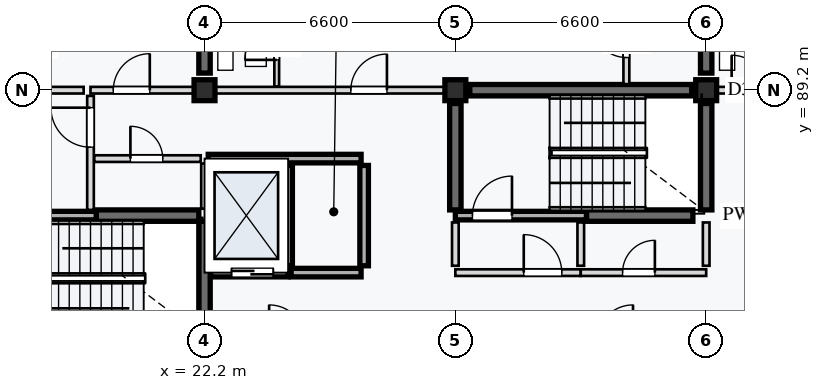
"""IFC4 building model, lengths in metres.
Left out: names, types, materials, properties, quantities, classifications, styles, units other than length and angle.
Written with IfcOpenShell. Run it as: python <this file> out.ifc"""

import sys

from ifc_helpers import new_model, si_unit, direction, frame, frame_2d, origin, origin_2d, place, context, subcontext, project, spatial, rectangle, extrude, element, fill, save


model = new_model("IFC4")
c1 = context("Model", 3, precision=1e-05, world=origin(), true_north=direction((0.0, 1.0)))
c2 = subcontext(c1, "Body", "Model", "MODEL_VIEW")
j1 = project(units=[si_unit("LENGTHUNIT", "METRE"), si_unit("PLANEANGLEUNIT", "RADIAN")], contexts=[c1])
p1 = place(None, origin())
s1 = spatial("IfcSite", under=j1, at=p1, CompositionType="ELEMENT")
p2 = place(p1, origin())
s2 = spatial("IfcBuilding", under=s1, at=p2, CompositionType="ELEMENT")
p3 = place(p2, frame((0.0, 0.0, 30.8)))
s3 = spatial("IfcBuildingStorey", under=s2, at=p3, CompositionType="ELEMENT", Elevation=30.8)
for number, where, z_axis, x_axis in (
    (1, (22.2, 89.2, 0.0), (0.0, 0.0, 1.0), (1.0, 0.0, 0.0)),
    (2, (28.8, 89.2, 0.0), (0.0, 0.0, 1.0), (1.0, 0.0, 0.0)),
    (3, (35.4, 89.2, 0.0), (0.0, 0.0, 1.0), (1.0, 0.0, 0.0)),
):
    element("IfcColumn", number, at=place(p3, frame(where, z_axis=z_axis, x_axis=x_axis)), inside=s3, PredefinedType="COLUMN", context=c2, shape_type="SweptSolid", body=[
        extrude(rectangle(XDim=0.55, YDim=0.55, at=origin_2d()), origin(), (0.0, 0.0, 1.0), 3.2),
    ])
p4 = place(p3, frame((19.35, 85.9, 0.0), z_axis=(0.0, 0.0, 1.0), x_axis=(1.0, 0.0, 0.0)))
e4 = element("IfcWall", 4, at=p4, inside=s3, PredefinedType="SHEAR", context=c2, shape_type="SweptSolid", body=[
    extrude(rectangle(XDim=2.7, YDim=0.3, at=frame_2d((1.35, 0.0))), origin(), (0.0, 0.0, 1.0), 2.97),
])
p5 = place(p3, frame((22.2, 82.95, 0.0), z_axis=(0.0, 0.0, 1.0), x_axis=(0.0, 1.0, 0.0)))
e5 = element("IfcWall", 5, at=p5, inside=s3, PredefinedType="SHEAR", context=c2, shape_type="SweptSolid", body=[
    extrude(rectangle(XDim=2.8, YDim=0.3, at=frame_2d((1.4, 0.0))), origin(), (0.0, 0.0, 1.0), 2.97),
])
p6 = place(p3, frame((29.18, 89.2, 0.0), z_axis=(0.0, 0.0, 1.0), x_axis=(1.0, 0.0, 0.0)))
e6 = element("IfcWall", 6, at=p6, inside=s3, PredefinedType="SHEAR", context=c2, shape_type="SweptSolid", body=[
    extrude(rectangle(XDim=5.84, YDim=0.3, at=frame_2d((2.92, 0.0))), origin(), (0.0, 0.0, 1.0), 2.97),
])
for number, where, z_axis, x_axis in (
    (7, (32.25, 85.9, 0.0), (0.0, 0.0, 1.0), (1.0, 0.0, 0.0)),
    (8, (28.8, 86.05, 0.0), (0.0, 0.0, 1.0), (0.0, 1.0, 0.0)),
    (9, (35.4, 86.05, 0.0), (0.0, 0.0, 1.0), (0.0, 1.0, 0.0)),
):
    element("IfcWall", number, at=place(p3, frame(where, z_axis=z_axis, x_axis=x_axis)), inside=s3, PredefinedType="SHEAR", context=c2, shape_type="SweptSolid", body=[
        extrude(rectangle(XDim=2.8, YDim=0.3, at=frame_2d((1.4, 0.0))), origin(), (0.0, 0.0, 1.0), 2.97),
    ])
for number, where, z_axis, x_axis in (
    (10, (22.2, 89.65, 0.0), (0.0, 0.0, 1.0), (0.0, 1.0, 0.0)),
    (11, (35.4, 89.65, 0.0), (0.0, 0.0, 1.0), (0.0, 1.0, 0.0)),
):
    element("IfcWall", number, at=place(p3, frame(where, z_axis=z_axis, x_axis=x_axis)), inside=s3, PredefinedType="SHEAR", context=c2, shape_type="SweptSolid", body=[
        extrude(rectangle(XDim=5.7, YDim=0.3, at=frame_2d((2.85, 0.0))), origin(), (0.0, 0.0, 1.0), 2.97),
    ])
p7 = place(p3, frame((15.75, 85.9, 0.0), z_axis=(0.0, 0.0, 1.0), x_axis=(1.0, 0.0, 0.0)))
e12 = element("IfcWall", 12, at=p7, inside=s3, PredefinedType="STANDARD", context=c2, shape_type="SweptSolid", body=[
    extrude(rectangle(XDim=3.6, YDim=0.225, at=frame_2d((1.8, 0.0))), origin(), (0.0, 0.0, 1.0), 2.97),
])
p8 = place(p7, frame((0.45, 0.0, 0.0)))
e13 = element("IfcOpeningElement", 13, at=p8, cuts=e12, PredefinedType="OPENING", context=c2, shape_type="SweptSolid", body=[
    extrude(rectangle(XDim=1.0, YDim=2.16, at=frame_2d((0.5, 1.08))), frame((0.0, 0.123, 0.0), z_axis=(0.0, -1.0, 0.0), x_axis=(1.0, 0.0, 0.0)), (0.0, 0.0, 1.0), 0.245),
])
p9 = place(p3, frame((19.2, 86.05, 0.0), z_axis=(0.0, 0.0, 1.0), x_axis=(0.0, 1.0, 0.0)))
e14 = element("IfcWall", 14, at=p9, inside=s3, PredefinedType="PARTITIONING", context=c2, shape_type="SweptSolid", body=[
    extrude(rectangle(XDim=3.0, YDim=0.175, at=frame_2d((1.5, 0.0))), origin(), (0.0, 0.0, 1.0), 2.97),
])
p10 = place(p9, frame((1.65, 0.0, 0.0)))
e15 = element("IfcOpeningElement", 15, at=p10, cuts=e14, PredefinedType="OPENING", context=c2, shape_type="SweptSolid", body=[
    extrude(rectangle(XDim=1.04, YDim=2.12, at=frame_2d((0.52, 1.06))), frame((0.0, 0.097, 0.0), z_axis=(0.0, -1.0, 0.0), x_axis=(1.0, 0.0, 0.0)), (0.0, 0.0, 1.0), 0.195),
])
p11 = place(p3, frame((19.3, 87.4, 0.0), z_axis=(0.0, 0.0, 1.0), x_axis=(1.0, 0.0, 0.0)))
e16 = element("IfcWall", 16, at=p11, inside=s3, PredefinedType="PARTITIONING", context=c2, shape_type="SweptSolid", body=[
    extrude(rectangle(XDim=2.8, YDim=0.175, at=frame_2d((1.4, 0.0))), origin(), (0.0, 0.0, 1.0), 2.97),
])
p12 = place(p11, frame((0.95, 0.0, 0.0)))
e17 = element("IfcOpeningElement", 17, at=p12, cuts=e16, PredefinedType="OPENING", context=c2, shape_type="SweptSolid", body=[
    extrude(rectangle(XDim=0.85, YDim=2.0, at=frame_2d((0.425, 1.0))), frame((0.0, 0.097, 0.0), z_axis=(0.0, -1.0, 0.0), x_axis=(1.0, 0.0, 0.0)), (0.0, 0.0, 1.0), 0.195),
])
p13 = place(p3, frame((22.2, 86.08, 0.0), z_axis=(0.0, 0.0, 1.0), x_axis=(0.0, 1.0, 0.0)))
e18 = element("IfcWall", 18, at=p13, inside=s3, PredefinedType="PARTITIONING", context=c2, shape_type="SweptSolid", body=[
    extrude(rectangle(XDim=1.19, YDim=0.175, at=frame_2d((0.595, 0.0))), origin(), (0.0, 0.0, 1.0), 2.97),
])
p14 = place(p3, frame((22.36, 84.4, 0.0), z_axis=(0.0, 0.0, 1.0), x_axis=(1.0, 0.0, 0.0)))
e19 = element("IfcWall", 19, at=p14, inside=s3, PredefinedType="STANDARD", context=c2, shape_type="SweptSolid", body=[
    extrude(rectangle(XDim=2.04, YDim=0.225, at=frame_2d((1.02, 0.0))), origin(), (0.0, 0.0, 1.0), 2.97),
])
p15 = place(p14, frame((0.55, 0.0, 0.0)))
e20 = element("IfcOpeningElement", 20, at=p15, cuts=e19, PredefinedType="OPENING", context=c2, shape_type="SweptSolid", body=[
    extrude(rectangle(XDim=1.1, YDim=2.1, at=frame_2d((0.55, 1.05))), frame((0.0, 0.123, 0.0), z_axis=(0.0, -1.0, 0.0), x_axis=(1.0, 0.0, 0.0)), (0.0, 0.0, 1.0), 0.245),
])
p16 = place(p3, frame((24.48, 84.4, 0.0), z_axis=(0.0, 0.0, 1.0), x_axis=(1.0, 0.0, 0.0)))
e21 = element("IfcWall", 21, at=p16, inside=s3, PredefinedType="STANDARD", context=c2, shape_type="SweptSolid", body=[
    extrude(rectangle(XDim=1.84, YDim=0.225, at=frame_2d((0.92, 0.0))), origin(), (0.0, 0.0, 1.0), 2.97),
])
p17 = place(p3, frame((22.298, 87.4, 0.0), z_axis=(0.0, 0.0, 1.0), x_axis=(1.0, 0.0, 0.0)))
e22 = element("IfcWall", 22, at=p17, inside=s3, PredefinedType="STANDARD", context=c2, shape_type="SweptSolid", body=[
    extrude(rectangle(XDim=4.022, YDim=0.225, at=frame_2d((2.011, 0.0))), origin(), (0.0, 0.0, 1.0), 2.97),
])
for number, where, z_axis, x_axis in (
    (23, (24.4, 84.58, 0.0), (0.0, 0.0, 1.0), (0.0, 1.0, 0.0)),
    (24, (26.4, 84.58, 0.0), (0.0, 0.0, 1.0), (0.0, 1.0, 0.0)),
):
    element("IfcWall", number, at=place(p3, frame(where, z_axis=z_axis, x_axis=x_axis)), inside=s3, PredefinedType="STANDARD", context=c2, shape_type="SweptSolid", body=[
        extrude(rectangle(XDim=2.64, YDim=0.225, at=frame_2d((1.32, 0.0))), origin(), (0.0, 0.0, 1.0), 2.97),
    ])
p18 = place(p3, frame((28.8, 85.9, 0.0), z_axis=(0.0, 0.0, 1.0), x_axis=(1.0, 0.0, 0.0)))
e25 = element("IfcWall", 25, at=p18, inside=s3, PredefinedType="STANDARD", context=c2, shape_type="SweptSolid", body=[
    extrude(rectangle(XDim=3.45, YDim=0.225, at=frame_2d((1.725, 0.0))), origin(), (0.0, 0.0, 1.0), 2.97),
])
p19 = place(p18, frame((0.45, 0.0, 0.0)))
e26 = element("IfcOpeningElement", 26, at=p19, cuts=e25, PredefinedType="OPENING", context=c2, shape_type="SweptSolid", body=[
    extrude(rectangle(XDim=1.04, YDim=2.12, at=frame_2d((0.52, 1.06))), frame((0.0, 0.123, 0.0), z_axis=(0.0, -1.0, 0.0), x_axis=(1.0, 0.0, 0.0)), (0.0, 0.0, 1.0), 0.245),
])
p20 = place(p3, frame((28.8, 84.4, 0.0), z_axis=(0.0, 0.0, 1.0), x_axis=(1.0, 0.0, 0.0)))
e27 = element("IfcWall", 27, at=p20, inside=s3, PredefinedType="PARTITIONING", context=c2, shape_type="SweptSolid", body=[
    extrude(rectangle(XDim=3.3, YDim=0.175, at=frame_2d((1.65, 0.0))), origin(), (0.0, 0.0, 1.0), 2.97),
])
p21 = place(p20, frame((1.8, 0.0, 0.0)))
e28 = element("IfcOpeningElement", 28, at=p21, cuts=e27, PredefinedType="OPENING", context=c2, shape_type="SweptSolid", body=[
    extrude(rectangle(XDim=1.0, YDim=2.1, at=frame_2d((0.5, 1.05))), frame((0.0, 0.097, 0.0), z_axis=(0.0, -1.0, 0.0), x_axis=(1.0, 0.0, 0.0)), (0.0, 0.0, 1.0), 0.195),
])
p22 = place(p3, frame((32.1, 84.4, 0.0), z_axis=(0.0, 0.0, 1.0), x_axis=(1.0, 0.0, 0.0)))
e29 = element("IfcWall", 29, at=p22, inside=s3, PredefinedType="PARTITIONING", context=c2, shape_type="SweptSolid", body=[
    extrude(rectangle(XDim=3.3, YDim=0.175, at=frame_2d((1.65, 0.0))), origin(), (0.0, 0.0, 1.0), 2.97),
])
p23 = place(p22, frame((1.1, 0.0, 0.0)))
e30 = element("IfcOpeningElement", 30, at=p23, cuts=e29, PredefinedType="OPENING", context=c2, shape_type="SweptSolid", body=[
    extrude(rectangle(XDim=0.85, YDim=2.0, at=frame_2d((0.425, 1.0))), frame((0.0, 0.097, 0.0), z_axis=(0.0, -1.0, 0.0), x_axis=(1.0, 0.0, 0.0)), (0.0, 0.0, 1.0), 0.195),
])
for number, where, z_axis, x_axis in (
    (31, (28.8, 84.58, 0.0), (0.0, 0.0, 1.0), (0.0, 1.0, 0.0)),
    (32, (32.1, 84.58, 0.0), (0.0, 0.0, 1.0), (0.0, 1.0, 0.0)),
    (33, (35.4, 84.58, 0.0), (0.0, 0.0, 1.0), (0.0, 1.0, 0.0)),
):
    element("IfcWall", number, at=place(p3, frame(where, z_axis=z_axis, x_axis=x_axis)), inside=s3, PredefinedType="PARTITIONING", context=c2, shape_type="SweptSolid", body=[
        extrude(rectangle(XDim=1.14, YDim=0.175, at=frame_2d((0.57, 0.0))), origin(), (0.0, 0.0, 1.0), 2.97),
    ])
p24 = place(p3, frame((15.88, 89.2, 0.0), z_axis=(0.0, 0.0, 1.0), x_axis=(1.0, 0.0, 0.0)))
e34 = element("IfcWall", 34, at=p24, inside=s3, PredefinedType="PARTITIONING", context=c2, shape_type="SweptSolid", body=[
    extrude(rectangle(XDim=3.14, YDim=0.175, at=frame_2d((1.57, 0.0))), origin(), (0.0, 0.0, 1.0), 2.55),
])
p25 = place(p3, frame((19.2, 89.2, 0.0), z_axis=(0.0, 0.0, 1.0), x_axis=(1.0, 0.0, 0.0)))
e35 = element("IfcWall", 35, at=p25, inside=s3, PredefinedType="PARTITIONING", context=c2, shape_type="SweptSolid", body=[
    extrude(rectangle(XDim=3.0, YDim=0.175, at=frame_2d((1.5, 0.0))), origin(), (0.0, 0.0, 1.0), 2.55),
])
p26 = place(p25, frame((0.6, 0.0, 0.0)))
e36 = element("IfcOpeningElement", 36, at=p26, cuts=e35, PredefinedType="OPENING", context=c2, shape_type="SweptSolid", body=[
    extrude(rectangle(XDim=0.96, YDim=2.18, at=frame_2d((0.48, 1.09))), frame((0.0, 0.097, 0.0), z_axis=(0.0, -1.0, 0.0), x_axis=(1.0, 0.0, 0.0)), (0.0, 0.0, 1.0), 0.195),
])
p27 = place(p3, frame((22.2, 89.2, 0.0), z_axis=(0.0, 0.0, 1.0), x_axis=(1.0, 0.0, 0.0)))
e37 = element("IfcWall", 37, at=p27, inside=s3, PredefinedType="PARTITIONING", context=c2, shape_type="SweptSolid", body=[
    extrude(rectangle(XDim=6.6, YDim=0.175, at=frame_2d((3.3, 0.0))), origin(), (0.0, 0.0, 1.0), 2.55),
])
p28 = place(p27, frame((3.85, 0.0, 0.0)))
e38 = element("IfcOpeningElement", 38, at=p28, cuts=e37, PredefinedType="OPENING", context=c2, shape_type="SweptSolid", body=[
    extrude(rectangle(XDim=0.95, YDim=2.16, at=frame_2d((0.475, 1.08))), frame((0.0, 0.097, 0.0), z_axis=(0.0, -1.0, 0.0), x_axis=(1.0, 0.0, 0.0)), (0.0, 0.0, 1.0), 0.195),
])
p29 = place(p3, frame((24.1, 89.298, 0.0), z_axis=(0.0, 0.0, 1.0), x_axis=(0.0, 1.0, 0.0)))
e39 = element("IfcWall", 39, at=p29, inside=s3, PredefinedType="PARTITIONING", context=c2, shape_type="SweptSolid", body=[
    extrude(rectangle(XDim=2.302, YDim=0.125, at=frame_2d((1.151, 0.0))), origin(), (0.0, 0.0, 1.0), 2.97),
])
p30 = place(p29, frame((0.7, 0.0, 0.0)))
e40 = element("IfcOpeningElement", 40, at=p30, cuts=e39, PredefinedType="OPENING", context=c2, shape_type="SweptSolid", body=[
    extrude(rectangle(XDim=0.84, YDim=2.06, at=frame_2d((0.42, 1.03))), frame((0.0, 0.073, 0.0), z_axis=(0.0, -1.0, 0.0), x_axis=(1.0, 0.0, 0.0)), (0.0, 0.0, 1.0), 0.145),
])
p31 = place(p3, frame((33.3, 89.36, 0.0), z_axis=(0.0, 0.0, 1.0), x_axis=(0.0, 1.0, 0.0)))
e41 = element("IfcWall", 41, at=p31, inside=s3, PredefinedType="PARTITIONING", context=c2, shape_type="SweptSolid", body=[
    extrude(rectangle(XDim=2.24, YDim=0.155, at=frame_2d((1.12, 0.0))), origin(), (0.0, 0.0, 1.0), 2.97),
])
p32 = place(p31, frame((0.7, 0.0, 0.0)))
e42 = element("IfcOpeningElement", 42, at=p32, cuts=e41, PredefinedType="OPENING", context=c2, shape_type="SweptSolid", body=[
    extrude(rectangle(XDim=0.88, YDim=2.1, at=frame_2d((0.44, 1.05))), frame((0.0, 0.087, 0.0), z_axis=(0.0, -1.0, 0.0), x_axis=(1.0, 0.0, 0.0)), (0.0, 0.0, 1.0), 0.175),
])
p33 = place(p3, frame((35.4, 89.2, 0.0), z_axis=(0.0, 0.0, 1.0), x_axis=(1.0, 0.0, 0.0)))
e43 = element("IfcWall", 43, at=p33, inside=s3, PredefinedType="PARTITIONING", context=c2, shape_type="SweptSolid", body=[
    extrude(rectangle(XDim=13.2, YDim=0.175, at=frame_2d((6.6, 0.0))), origin(), (0.0, 0.0, 1.0), 2.55),
])
p34 = place(p33, frame((0.67, 0.0, 0.0)))
e44 = element("IfcOpeningElement", 44, at=p34, cuts=e43, PredefinedType="OPENING", context=c2, shape_type="SweptSolid", body=[
    extrude(rectangle(XDim=0.92, YDim=2.14, at=frame_2d((0.46, 1.07))), frame((0.0, 0.097, 0.0), z_axis=(0.0, -1.0, 0.0), x_axis=(1.0, 0.0, 0.0)), (0.0, 0.0, 1.0), 0.195),
])
p35 = place(p10, origin())
e45 = element("IfcDoor", 45, at=p35, inside=s3, OperationType="SINGLE_SWING_RIGHT", PredefinedType="DOOR", context=c2, shape_type="SweptSolid", body=[
    extrude(rectangle(XDim=1.04, YDim=2.12, at=frame_2d((0.52, 1.06))), frame((0.0, 0.025, 0.0), z_axis=(0.0, -1.0, 0.0), x_axis=(1.0, 0.0, 0.0)), (0.0, 0.0, 1.0), 0.05),
])
fill(e15, e45)
p36 = place(p12, origin())
e46 = element("IfcDoor", 46, at=p36, inside=s3, OperationType="SINGLE_SWING_LEFT", PredefinedType="DOOR", context=c2, shape_type="SweptSolid", body=[
    extrude(rectangle(XDim=0.85, YDim=2.0, at=frame_2d((0.425, 1.0))), frame((0.0, 0.025, 0.0), z_axis=(0.0, -1.0, 0.0), x_axis=(1.0, 0.0, 0.0)), (0.0, 0.0, 1.0), 0.05),
])
fill(e17, e46)
p37 = place(p15, origin())
e47 = element("IfcDoor", 47, at=p37, inside=s3, OperationType="DOUBLE_DOOR_SLIDING", PredefinedType="DOOR", context=c2, shape_type="SweptSolid", body=[
    extrude(rectangle(XDim=1.1, YDim=2.1, at=frame_2d((0.55, 1.05))), frame((0.0, 0.025, 0.0), z_axis=(0.0, -1.0, 0.0), x_axis=(1.0, 0.0, 0.0)), (0.0, 0.0, 1.0), 0.05),
])
fill(e20, e47)
p38 = place(p19, origin())
e48 = element("IfcDoor", 48, at=p38, inside=s3, OperationType="SINGLE_SWING_RIGHT", PredefinedType="DOOR", context=c2, shape_type="SweptSolid", body=[
    extrude(rectangle(XDim=1.04, YDim=2.12, at=frame_2d((0.52, 1.06))), frame((0.0, 0.025, 0.0), z_axis=(0.0, -1.0, 0.0), x_axis=(1.0, 0.0, 0.0)), (0.0, 0.0, 1.0), 0.05),
])
fill(e26, e48)
p39 = place(p21, origin())
e49 = element("IfcDoor", 49, at=p39, inside=s3, OperationType="SINGLE_SWING_LEFT", PredefinedType="DOOR", context=c2, shape_type="SweptSolid", body=[
    extrude(rectangle(XDim=1.0, YDim=2.1, at=frame_2d((0.5, 1.05))), frame((0.0, 0.025, 0.0), z_axis=(0.0, -1.0, 0.0), x_axis=(1.0, 0.0, 0.0)), (0.0, 0.0, 1.0), 0.05),
])
fill(e28, e49)
p40 = place(p23, origin())
e50 = element("IfcDoor", 50, at=p40, inside=s3, OperationType="SINGLE_SWING_RIGHT", PredefinedType="DOOR", context=c2, shape_type="SweptSolid", body=[
    extrude(rectangle(XDim=0.85, YDim=2.0, at=frame_2d((0.425, 1.0))), frame((0.0, 0.025, 0.0), z_axis=(0.0, -1.0, 0.0), x_axis=(1.0, 0.0, 0.0)), (0.0, 0.0, 1.0), 0.05),
])
fill(e30, e50)
p41 = place(p26, origin())
e51 = element("IfcDoor", 51, at=p41, inside=s3, OperationType="SINGLE_SWING_RIGHT", PredefinedType="DOOR", context=c2, shape_type="SweptSolid", body=[
    extrude(rectangle(XDim=0.96, YDim=2.18, at=frame_2d((0.48, 1.09))), frame((0.0, 0.025, 0.0), z_axis=(0.0, -1.0, 0.0), x_axis=(1.0, 0.0, 0.0)), (0.0, 0.0, 1.0), 0.05),
])
fill(e36, e51)
p42 = place(p28, origin())
e52 = element("IfcDoor", 52, at=p42, inside=s3, OperationType="SINGLE_SWING_RIGHT", PredefinedType="DOOR", context=c2, shape_type="SweptSolid", body=[
    extrude(rectangle(XDim=0.95, YDim=2.16, at=frame_2d((0.475, 1.08))), frame((0.0, 0.025, 0.0), z_axis=(0.0, -1.0, 0.0), x_axis=(1.0, 0.0, 0.0)), (0.0, 0.0, 1.0), 0.05),
])
fill(e38, e52)
p43 = place(p30, origin())
e53 = element("IfcDoor", 53, at=p43, inside=s3, OperationType="SINGLE_SWING_LEFT", PredefinedType="DOOR", context=c2, shape_type="SweptSolid", body=[
    extrude(rectangle(XDim=0.84, YDim=2.06, at=frame_2d((0.42, 1.03))), frame((0.0, 0.025, 0.0), z_axis=(0.0, -1.0, 0.0), x_axis=(1.0, 0.0, 0.0)), (0.0, 0.0, 1.0), 0.05),
])
fill(e40, e53)
p44 = place(p32, origin())
e54 = element("IfcDoor", 54, at=p44, inside=s3, OperationType="SINGLE_SWING_RIGHT", PredefinedType="DOOR", context=c2, shape_type="SweptSolid", body=[
    extrude(rectangle(XDim=0.88, YDim=2.1, at=frame_2d((0.44, 1.05))), frame((0.0, 0.025, 0.0), z_axis=(0.0, -1.0, 0.0), x_axis=(1.0, 0.0, 0.0)), (0.0, 0.0, 1.0), 0.05),
])
fill(e42, e54)
p45 = place(p34, origin())
e55 = element("IfcDoor", 55, at=p45, inside=s3, OperationType="SINGLE_SWING_LEFT", PredefinedType="DOOR", context=c2, shape_type="SweptSolid", body=[
    extrude(rectangle(XDim=0.92, YDim=2.14, at=frame_2d((0.46, 1.07))), frame((0.0, 0.025, 0.0), z_axis=(0.0, -1.0, 0.0), x_axis=(1.0, 0.0, 0.0)), (0.0, 0.0, 1.0), 0.05),
])
fill(e44, e55)
save(model, sys.argv[1])
